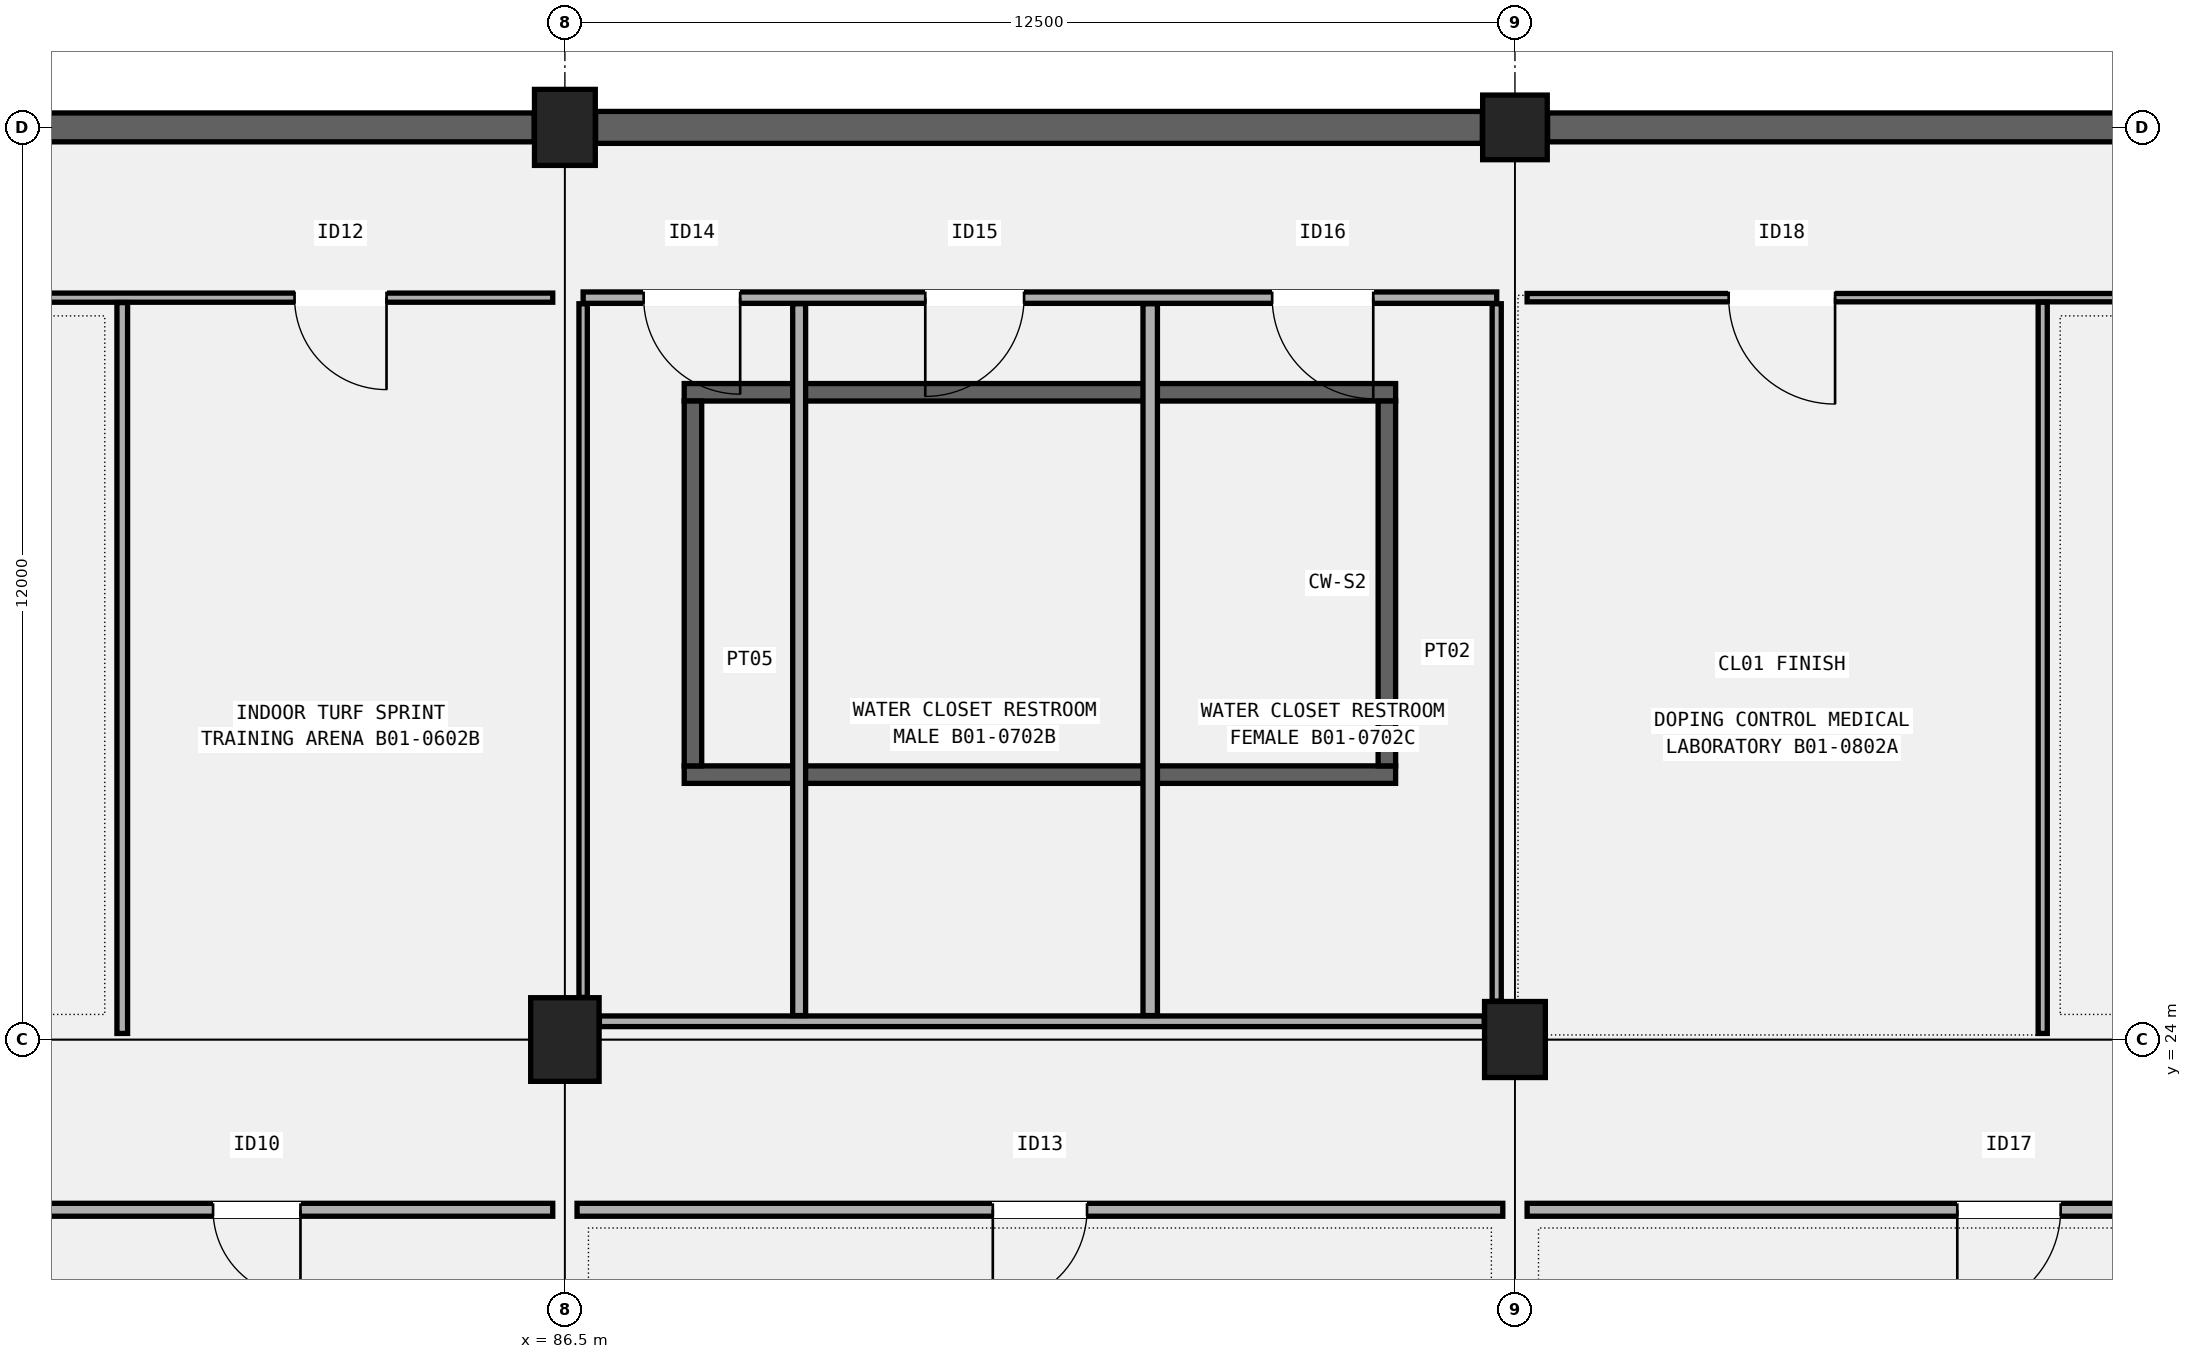
"""IFC4 building model, lengths in metres.
Left out: names, types, materials, properties, quantities, classifications, styles, units other than length and angle.
Written with IfcOpenShell. Run it as: python <this file> out.ifc"""

import sys

from ifc_helpers import new_model, si_unit, direction, frame, frame_2d, origin, origin_2d, place, context, subcontext, project, spatial, rectangle, circle, extrude, element, fill, save


model = new_model("IFC4")
c1 = context("Model", 3, precision=1e-05, world=origin(), true_north=direction((0.0, 1.0)))
c2 = subcontext(c1, "Body", "Model", "MODEL_VIEW")
j1 = project(units=[si_unit("LENGTHUNIT", "METRE"), si_unit("PLANEANGLEUNIT", "RADIAN")], contexts=[c1])
p1 = place(None, origin())
s1 = spatial("IfcSite", under=j1, at=p1, CompositionType="ELEMENT")
p2 = place(p1, origin())
s2 = spatial("IfcBuilding", under=s1, at=p2, CompositionType="ELEMENT")
p3 = place(p2, frame((0.0, 0.0, -4.8)))
s3 = spatial("IfcBuildingStorey", under=s2, at=p3, CompositionType="ELEMENT", Elevation=-4.8)
p4 = place(p3, frame((86.5, 24.0, 0.0), z_axis=(0.0, 0.0, 1.0), x_axis=(1.0, 0.0, 0.0)))
e1 = element("IfcColumn", 1, at=p4, inside=s3, PredefinedType="COLUMN", context=c2, shape_type="SweptSolid", body=[
    extrude(rectangle(XDim=0.9, YDim=1.1, at=origin_2d()), origin(), (0.0, 0.0, 1.0), 4.8),
])
for number, where, z_axis, x_axis in (
    (2, (86.5, 36.0, 0.0), (0.0, 0.0, 1.0), (1.0, 0.0, 0.0)),
    (3, (99.0, 24.0, 0.0), (0.0, 0.0, 1.0), (1.0, 0.0, 0.0)),
):
    element("IfcColumn", number, at=place(p3, frame(where, z_axis=z_axis, x_axis=x_axis)), inside=s3, PredefinedType="COLUMN", context=c2, shape_type="SweptSolid", body=[
        extrude(rectangle(XDim=0.8, YDim=1.0, at=origin_2d()), origin(), (0.0, 0.0, 1.0), 4.8),
    ])
p5 = place(p3, frame((99.0, 36.0, 0.0), z_axis=(0.0, 0.0, 1.0), x_axis=(1.0, 0.0, 0.0)))
e4 = element("IfcColumn", 4, at=p5, inside=s3, PredefinedType="COLUMN", context=c2, shape_type="SweptSolid", body=[
    extrude(circle(Radius=0.425, at=origin_2d()), origin(), (0.0, 0.0, 1.0), 4.8),
])
p6 = place(p3, frame((74.454, 36.0, 0.0), z_axis=(0.0, 0.0, 1.0), x_axis=(1.0, 0.0, 0.0)))
e5 = element("IfcWall", 5, at=p6, inside=s3, PredefinedType="STANDARD", context=c2, shape_type="SweptSolid", body=[
    extrude(rectangle(XDim=11.642, YDim=0.38, at=frame_2d((5.821, 0.0))), origin(), (0.0, 0.0, 1.0), 4.46),
])
p7 = place(p3, frame((86.904, 36.0, 0.0), z_axis=(0.0, 0.0, 1.0), x_axis=(1.0, 0.0, 0.0)))
e6 = element("IfcWall", 6, at=p7, inside=s3, PredefinedType="STANDARD", context=c2, shape_type="SweptSolid", body=[
    extrude(rectangle(XDim=11.667, YDim=0.42, at=frame_2d((5.833, 0.0))), origin(), (0.0, 0.0, 1.0), 4.46),
])
p8 = place(p3, frame((99.429, 36.0, 0.0), z_axis=(0.0, 0.0, 1.0), x_axis=(1.0, 0.0, 0.0)))
e7 = element("IfcWall", 7, at=p8, inside=s3, PredefinedType="STANDARD", context=c2, shape_type="SweptSolid", body=[
    extrude(rectangle(XDim=12.067, YDim=0.38, at=frame_2d((6.034, 0.0))), origin(), (0.0, 0.0, 1.0), 4.46),
])
for number, where, z_axis, x_axis in (
    (8, (88.07, 27.485, 0.0), (0.0, 0.0, 1.0), (1.0, 0.0, 0.0)),
    (9, (88.07, 32.515, 0.0), (0.0, 0.0, 1.0), (1.0, 0.0, 0.0)),
):
    element("IfcWall", number, at=place(p3, frame(where, z_axis=z_axis, x_axis=x_axis)), inside=s3, PredefinedType="SHEAR", context=c2, shape_type="SweptSolid", body=[
        extrude(rectangle(XDim=9.36, YDim=0.23, at=frame_2d((4.68, 0.0))), origin(), (0.0, 0.0, 1.0), 4.5),
    ])
for number, where, z_axis, x_axis in (
    (10, (88.185, 27.6, 0.0), (0.0, 0.0, 1.0), (0.0, 1.0, 0.0)),
    (11, (97.315, 27.6, 0.0), (0.0, 0.0, 1.0), (0.0, 1.0, 0.0)),
):
    element("IfcWall", number, at=place(p3, frame(where, z_axis=z_axis, x_axis=x_axis)), inside=s3, PredefinedType="SHEAR", context=c2, shape_type="SweptSolid", body=[
        extrude(rectangle(XDim=4.8, YDim=0.23, at=frame_2d((2.4, 0.0))), origin(), (0.0, 0.0, 1.0), 4.5),
    ])
p9 = place(p3, frame((74.16, 21.76, 0.0), z_axis=(0.0, 0.0, 1.0), x_axis=(1.0, 0.0, 0.0)))
e12 = element("IfcWall", 12, at=p9, inside=s3, PredefinedType="PARTITIONING", context=c2, shape_type="SweptSolid", body=[
    extrude(rectangle(XDim=12.18, YDim=0.17, at=frame_2d((6.09, 0.0))), origin(), (0.0, 0.0, 1.0), 3.92),
])
p10 = place(p9, frame((2.676, 0.0, 0.0), z_axis=(0.0, 0.0, 1.0), x_axis=(-1.0, 0.0, 0.0)))
e13 = element("IfcOpeningElement", 13, at=p10, cuts=e12, PredefinedType="OPENING", context=c2, shape_type="SweptSolid", body=[
    extrude(rectangle(XDim=1.12, YDim=2.18, at=frame_2d((0.56, 1.09))), frame((0.0, 0.095, 0.0), z_axis=(0.0, -1.0, 0.0), x_axis=(1.0, 0.0, 0.0)), (0.0, 0.0, 1.0), 0.19),
])
p11 = place(p9, frame((8.861, 0.0, 0.0), z_axis=(0.0, 0.0, 1.0), x_axis=(-1.0, 0.0, 0.0)))
e14 = element("IfcOpeningElement", 14, at=p11, cuts=e12, PredefinedType="OPENING", context=c2, shape_type="SweptSolid", body=[
    extrude(rectangle(XDim=1.15, YDim=2.15, at=frame_2d((0.575, 1.075))), frame((0.0, 0.095, 0.0), z_axis=(0.0, -1.0, 0.0), x_axis=(1.0, 0.0, 0.0)), (0.0, 0.0, 1.0), 0.19),
])
p12 = place(p3, frame((74.16, 33.76, 0.0), z_axis=(0.0, 0.0, 1.0), x_axis=(1.0, 0.0, 0.0)))
e15 = element("IfcWall", 15, at=p12, inside=s3, PredefinedType="PARTITIONING", context=c2, shape_type="SweptSolid", body=[
    extrude(rectangle(XDim=12.18, YDim=0.12, at=frame_2d((6.09, 0.0))), origin(), (0.0, 0.0, 1.0), 3.92),
])
p13 = place(p12, frame((3.808, 0.0, 0.0), z_axis=(0.0, 0.0, 1.0), x_axis=(-1.0, 0.0, 0.0)))
e16 = element("IfcOpeningElement", 16, at=p13, cuts=e15, PredefinedType="OPENING", context=c2, shape_type="SweptSolid", body=[
    extrude(rectangle(XDim=1.18, YDim=2.2, at=frame_2d((0.59, 1.1))), frame((0.0, 0.07, 0.0), z_axis=(0.0, -1.0, 0.0), x_axis=(1.0, 0.0, 0.0)), (0.0, 0.0, 1.0), 0.14),
])
p14 = place(p12, frame((9.993, 0.0, 0.0), z_axis=(0.0, 0.0, 1.0), x_axis=(-1.0, 0.0, 0.0)))
e17 = element("IfcOpeningElement", 17, at=p14, cuts=e15, PredefinedType="OPENING", context=c2, shape_type="SweptSolid", body=[
    extrude(rectangle(XDim=1.21, YDim=2.18, at=frame_2d((0.605, 1.09))), frame((0.0, 0.07, 0.0), z_axis=(0.0, -1.0, 0.0), x_axis=(1.0, 0.0, 0.0)), (0.0, 0.0, 1.0), 0.14),
])
p15 = place(p3, frame((80.676, 24.08, 0.0), z_axis=(0.0, 0.0, 1.0), x_axis=(0.0, 1.0, 0.0)))
e18 = element("IfcWall", 18, at=p15, inside=s3, PredefinedType="PARTITIONING", context=c2, shape_type="SweptSolid", body=[
    extrude(rectangle(XDim=9.615, YDim=0.14, at=frame_2d((4.808, 0.0))), origin(), (0.0, 0.0, 1.0), 3.92),
])
p16 = place(p3, frame((86.66, 21.76, 0.0), z_axis=(0.0, 0.0, 1.0), x_axis=(1.0, 0.0, 0.0)))
e19 = element("IfcWall", 19, at=p16, inside=s3, PredefinedType="PARTITIONING", context=c2, shape_type="SweptSolid", body=[
    extrude(rectangle(XDim=12.18, YDim=0.17, at=frame_2d((6.09, 0.0))), origin(), (0.0, 0.0, 1.0), 3.92),
])
p17 = place(p16, frame((6.71, 0.0, 0.0), z_axis=(0.0, 0.0, 1.0), x_axis=(-1.0, 0.0, 0.0)))
e20 = element("IfcOpeningElement", 20, at=p17, cuts=e19, PredefinedType="OPENING", context=c2, shape_type="SweptSolid", body=[
    extrude(rectangle(XDim=1.24, YDim=2.22, at=frame_2d((0.62, 1.11))), frame((0.0, 0.095, 0.0), z_axis=(0.0, -1.0, 0.0), x_axis=(1.0, 0.0, 0.0)), (0.0, 0.0, 1.0), 0.19),
])
p18 = place(p3, frame((86.74, 33.76, 0.0), z_axis=(0.0, 0.0, 1.0), x_axis=(1.0, 0.0, 0.0)))
e21 = element("IfcWall", 21, at=p18, inside=s3, PredefinedType="PARTITIONING", context=c2, shape_type="SweptSolid", body=[
    extrude(rectangle(XDim=12.02, YDim=0.15, at=frame_2d((6.01, 0.0))), origin(), (0.0, 0.0, 1.0), 3.92),
])
p19 = place(p18, frame((2.066, 0.0, 0.0), z_axis=(0.0, 0.0, 1.0), x_axis=(-1.0, 0.0, 0.0)))
e22 = element("IfcOpeningElement", 22, at=p19, cuts=e21, PredefinedType="OPENING", context=c2, shape_type="SweptSolid", body=[
    extrude(rectangle(XDim=1.27, YDim=2.2, at=frame_2d((0.635, 1.1))), frame((0.0, 0.085, 0.0), z_axis=(0.0, -1.0, 0.0), x_axis=(1.0, 0.0, 0.0)), (0.0, 0.0, 1.0), 0.17),
])
p20 = place(p18, frame((5.802, 0.0, 0.0), z_axis=(0.0, 0.0, 1.0), x_axis=(-1.0, 0.0, 0.0)))
e23 = element("IfcOpeningElement", 23, at=p20, cuts=e21, PredefinedType="OPENING", context=c2, shape_type="SweptSolid", body=[
    extrude(rectangle(XDim=1.3, YDim=2.24, at=frame_2d((0.65, 1.12))), frame((0.0, 0.085, 0.0), z_axis=(0.0, -1.0, 0.0), x_axis=(1.0, 0.0, 0.0)), (0.0, 0.0, 1.0), 0.17),
])
p21 = place(p18, frame((10.396, 0.0, 0.0), z_axis=(0.0, 0.0, 1.0), x_axis=(-1.0, 0.0, 0.0)))
e24 = element("IfcOpeningElement", 24, at=p21, cuts=e21, PredefinedType="OPENING", context=c2, shape_type="SweptSolid", body=[
    extrude(rectangle(XDim=1.33, YDim=2.22, at=frame_2d((0.665, 1.11))), frame((0.0, 0.085, 0.0), z_axis=(0.0, -1.0, 0.0), x_axis=(1.0, 0.0, 0.0)), (0.0, 0.0, 1.0), 0.17),
])
p22 = place(p3, frame((86.74, 24.554, 0.0), z_axis=(0.0, 0.0, 1.0), x_axis=(0.0, 1.0, 0.0)))
e25 = element("IfcWall", 25, at=p22, inside=s3, PredefinedType="PARTITIONING", context=c2, shape_type="SweptSolid", body=[
    extrude(rectangle(XDim=9.126, YDim=0.11, at=frame_2d((4.563, 0.0))), origin(), (0.0, 0.0, 1.0), 3.52),
])
p23 = place(p3, frame((98.76, 24.504, 0.0), z_axis=(0.0, 0.0, 1.0), x_axis=(0.0, 1.0, 0.0)))
e26 = element("IfcWall", 26, at=p23, inside=s3, PredefinedType="PARTITIONING", context=c2, shape_type="SweptSolid", body=[
    extrude(rectangle(XDim=9.176, YDim=0.12, at=frame_2d((4.588, 0.0))), origin(), (0.0, 0.0, 1.0), 3.62),
])
p24 = place(p3, frame((86.954, 24.24, 0.0), z_axis=(0.0, 0.0, 1.0), x_axis=(1.0, 0.0, 0.0)))
e27 = element("IfcWall", 27, at=p24, inside=s3, PredefinedType="PARTITIONING", context=c2, shape_type="SweptSolid", body=[
    extrude(rectangle(XDim=11.642, YDim=0.14, at=frame_2d((5.821, 0.0))), origin(), (0.0, 0.0, 1.0), 3.52),
])
p25 = place(p3, frame((89.582, 24.315, 0.0), z_axis=(0.0, 0.0, 1.0), x_axis=(0.0, 1.0, 0.0)))
e28 = element("IfcWall", 28, at=p25, inside=s3, PredefinedType="PARTITIONING", context=c2, shape_type="SweptSolid", body=[
    extrude(rectangle(XDim=9.365, YDim=0.17, at=frame_2d((4.683, 0.0))), origin(), (0.0, 0.0, 1.0), 3.92),
])
p26 = place(p3, frame((94.201, 24.315, 0.0), z_axis=(0.0, 0.0, 1.0), x_axis=(0.0, 1.0, 0.0)))
e29 = element("IfcWall", 29, at=p26, inside=s3, PredefinedType="PARTITIONING", context=c2, shape_type="SweptSolid", body=[
    extrude(rectangle(XDim=9.365, YDim=0.19, at=frame_2d((4.683, 0.0))), origin(), (0.0, 0.0, 1.0), 3.92),
])
p27 = place(p3, frame((99.16, 21.76, 0.0), z_axis=(0.0, 0.0, 1.0), x_axis=(1.0, 0.0, 0.0)))
e30 = element("IfcWall", 30, at=p27, inside=s3, PredefinedType="PARTITIONING", context=c2, shape_type="SweptSolid", body=[
    extrude(rectangle(XDim=12.68, YDim=0.17, at=frame_2d((6.34, 0.0))), origin(), (0.0, 0.0, 1.0), 3.92),
])
p28 = place(p27, frame((7.02, 0.0, 0.0), z_axis=(0.0, 0.0, 1.0), x_axis=(-1.0, 0.0, 0.0)))
e31 = element("IfcOpeningElement", 31, at=p28, cuts=e30, PredefinedType="OPENING", context=c2, shape_type="SweptSolid", body=[
    extrude(rectangle(XDim=1.36, YDim=2.25, at=frame_2d((0.68, 1.125))), frame((0.0, 0.095, 0.0), z_axis=(0.0, -1.0, 0.0), x_axis=(1.0, 0.0, 0.0)), (0.0, 0.0, 1.0), 0.19),
])
p29 = place(p3, frame((99.16, 33.76, 0.0), z_axis=(0.0, 0.0, 1.0), x_axis=(1.0, 0.0, 0.0)))
e32 = element("IfcWall", 32, at=p29, inside=s3, PredefinedType="PARTITIONING", context=c2, shape_type="SweptSolid", body=[
    extrude(rectangle(XDim=12.68, YDim=0.11, at=frame_2d((6.34, 0.0))), origin(), (0.0, 0.0, 1.0), 3.92),
])
p30 = place(p29, frame((4.052, 0.0, 0.0), z_axis=(0.0, 0.0, 1.0), x_axis=(-1.0, 0.0, 0.0)))
e33 = element("IfcOpeningElement", 33, at=p30, cuts=e32, PredefinedType="OPENING", context=c2, shape_type="SweptSolid", body=[
    extrude(rectangle(XDim=1.4, YDim=2.24, at=frame_2d((0.7, 1.12))), frame((0.0, 0.065, 0.0), z_axis=(0.0, -1.0, 0.0), x_axis=(1.0, 0.0, 0.0)), (0.0, 0.0, 1.0), 0.13),
])
p31 = place(p29, frame((10.492, 0.0, 0.0), z_axis=(0.0, 0.0, 1.0), x_axis=(-1.0, 0.0, 0.0)))
e34 = element("IfcOpeningElement", 34, at=p31, cuts=e32, PredefinedType="OPENING", context=c2, shape_type="SweptSolid", body=[
    extrude(rectangle(XDim=1.44, YDim=2.26, at=frame_2d((0.72, 1.13))), frame((0.0, 0.065, 0.0), z_axis=(0.0, -1.0, 0.0), x_axis=(1.0, 0.0, 0.0)), (0.0, 0.0, 1.0), 0.13),
])
p32 = place(p3, frame((105.944, 24.08, 0.0), z_axis=(0.0, 0.0, 1.0), x_axis=(0.0, 1.0, 0.0)))
e35 = element("IfcWall", 35, at=p32, inside=s3, PredefinedType="PARTITIONING", context=c2, shape_type="SweptSolid", body=[
    extrude(rectangle(XDim=9.62, YDim=0.12, at=frame_2d((4.81, 0.0))), origin(), (0.0, 0.0, 1.0), 3.92),
])
p33 = place(p11, origin())
e36 = element("IfcDoor", 36, at=p33, inside=s3, OperationType="SINGLE_SWING_LEFT", PredefinedType="DOOR", context=c2, shape_type="SweptSolid", body=[
    extrude(rectangle(XDim=1.15, YDim=2.15, at=frame_2d((0.575, 1.075))), frame((0.0, 0.025, 0.0), z_axis=(0.0, -1.0, 0.0), x_axis=(1.0, 0.0, 0.0)), (0.0, 0.0, 1.0), 0.05),
])
fill(e14, e36)
p34 = place(p14, origin())
e37 = element("IfcDoor", 37, at=p34, inside=s3, OperationType="SINGLE_SWING_LEFT", PredefinedType="DOOR", context=c2, shape_type="SweptSolid", body=[
    extrude(rectangle(XDim=1.21, YDim=2.18, at=frame_2d((0.605, 1.09))), frame((0.0, 0.025, 0.0), z_axis=(0.0, -1.0, 0.0), x_axis=(1.0, 0.0, 0.0)), (0.0, 0.0, 1.0), 0.05),
])
fill(e17, e37)
p35 = place(p17, origin())
e38 = element("IfcDoor", 38, at=p35, inside=s3, OperationType="SINGLE_SWING_RIGHT", PredefinedType="DOOR", context=c2, shape_type="SweptSolid", body=[
    extrude(rectangle(XDim=1.24, YDim=2.22, at=frame_2d((0.62, 1.11))), frame((0.0, 0.025, 0.0), z_axis=(0.0, -1.0, 0.0), x_axis=(1.0, 0.0, 0.0)), (0.0, 0.0, 1.0), 0.05),
])
fill(e20, e38)
p36 = place(p19, origin())
e39 = element("IfcDoor", 39, at=p36, inside=s3, OperationType="SINGLE_SWING_LEFT", PredefinedType="DOOR", context=c2, shape_type="SweptSolid", body=[
    extrude(rectangle(XDim=1.27, YDim=2.2, at=frame_2d((0.635, 1.1))), frame((0.0, 0.025, 0.0), z_axis=(0.0, -1.0, 0.0), x_axis=(1.0, 0.0, 0.0)), (0.0, 0.0, 1.0), 0.05),
])
fill(e22, e39)
p37 = place(p20, origin())
e40 = element("IfcDoor", 40, at=p37, inside=s3, OperationType="SINGLE_SWING_RIGHT", PredefinedType="DOOR", context=c2, shape_type="SweptSolid", body=[
    extrude(rectangle(XDim=1.3, YDim=2.24, at=frame_2d((0.65, 1.12))), frame((0.0, 0.025, 0.0), z_axis=(0.0, -1.0, 0.0), x_axis=(1.0, 0.0, 0.0)), (0.0, 0.0, 1.0), 0.05),
])
fill(e23, e40)
p38 = place(p21, origin())
e41 = element("IfcDoor", 41, at=p38, inside=s3, OperationType="SINGLE_SWING_LEFT", PredefinedType="DOOR", context=c2, shape_type="SweptSolid", body=[
    extrude(rectangle(XDim=1.33, YDim=2.22, at=frame_2d((0.665, 1.11))), frame((0.0, 0.025, 0.0), z_axis=(0.0, -1.0, 0.0), x_axis=(1.0, 0.0, 0.0)), (0.0, 0.0, 1.0), 0.05),
])
fill(e24, e41)
p39 = place(p28, origin())
e42 = element("IfcDoor", 42, at=p39, inside=s3, OperationType="SINGLE_SWING_RIGHT", PredefinedType="DOOR", context=c2, shape_type="SweptSolid", body=[
    extrude(rectangle(XDim=1.36, YDim=2.25, at=frame_2d((0.68, 1.125))), frame((0.0, 0.025, 0.0), z_axis=(0.0, -1.0, 0.0), x_axis=(1.0, 0.0, 0.0)), (0.0, 0.0, 1.0), 0.05),
])
fill(e31, e42)
p40 = place(p30, origin())
e43 = element("IfcDoor", 43, at=p40, inside=s3, OperationType="SINGLE_SWING_LEFT", PredefinedType="DOOR", context=c2, shape_type="SweptSolid", body=[
    extrude(rectangle(XDim=1.4, YDim=2.24, at=frame_2d((0.7, 1.12))), frame((0.0, 0.025, 0.0), z_axis=(0.0, -1.0, 0.0), x_axis=(1.0, 0.0, 0.0)), (0.0, 0.0, 1.0), 0.05),
])
fill(e33, e43)
save(model, sys.argv[1])
